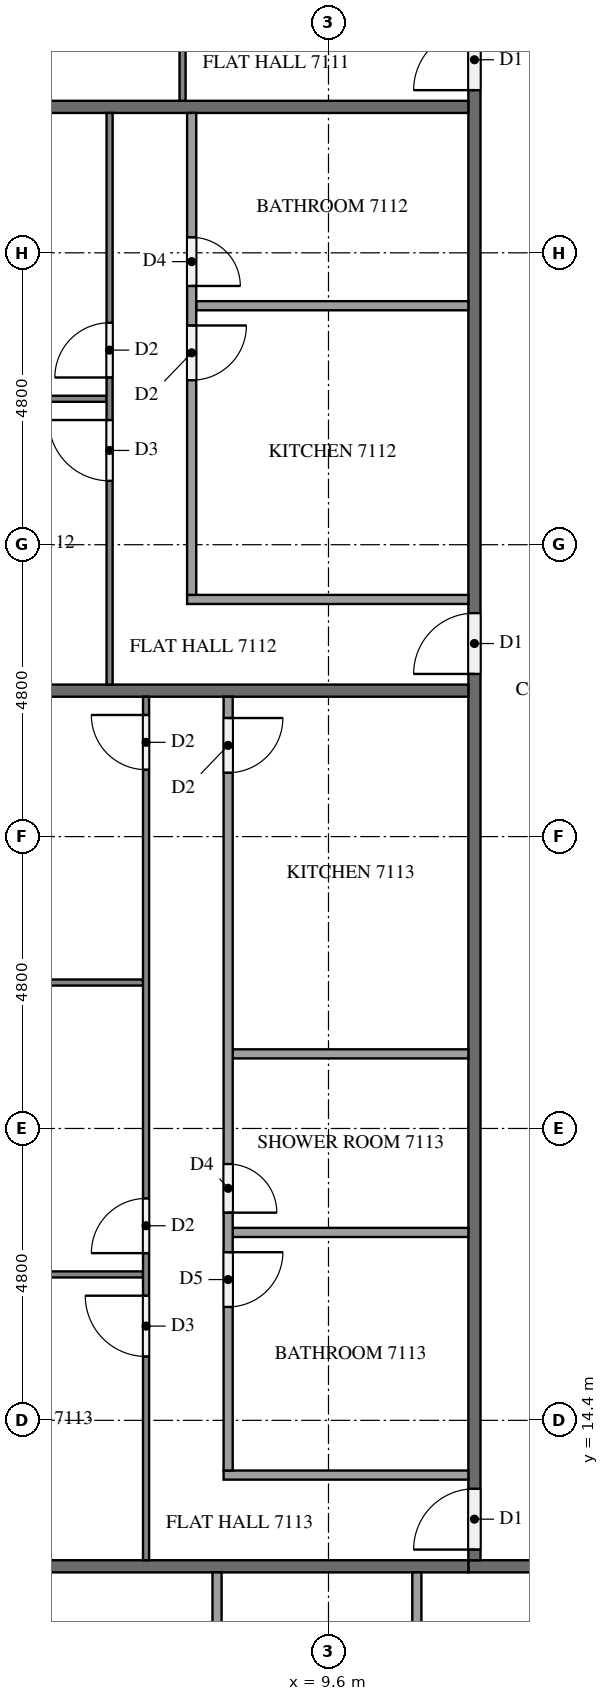
"""IFC4 building model, lengths in metres.
Left out: names, types, materials, properties, quantities, classifications, styles, units other than length and angle.
Written with IfcOpenShell. Run it as: python <this file> out.ifc"""

import sys

from ifc_helpers import new_model, si_unit, direction, frame, frame_2d, origin, place, context, subcontext, project, spatial, rectangle, extrude, element, fill, save


model = new_model("IFC4")
c1 = context("Model", 3, precision=1e-05, world=origin(), true_north=direction((0.0, 1.0)))
c2 = subcontext(c1, "Body", "Model", "MODEL_VIEW")
j1 = project(units=[si_unit("LENGTHUNIT", "METRE"), si_unit("PLANEANGLEUNIT", "RADIAN")], contexts=[c1])
p1 = place(None, origin())
s1 = spatial("IfcSite", under=j1, at=p1, CompositionType="ELEMENT")
p2 = place(p1, origin())
s2 = spatial("IfcBuilding", under=s1, at=p2, CompositionType="ELEMENT")
p3 = place(p2, frame((0.0, 0.0, 272.1)))
s3 = spatial("IfcBuildingStorey", under=s2, at=p3, CompositionType="ELEMENT", Elevation=272.1)
p4 = place(p3, frame((50.5, 12.0, 0.0), z_axis=(0.0, 0.0, 1.0), x_axis=(-1.0, 0.0, 0.0)))
e1 = element("IfcWall", 1, at=p4, inside=s3, PredefinedType="PARTITIONING", context=c2, shape_type="SweptSolid", body=[
    extrude(rectangle(XDim=38.6, YDim=0.2, at=frame_2d((19.3, 0.0))), origin(), (0.0, 0.0, 1.0), 3.2),
])
p5 = place(p4, frame((31.525, 0.0, 0.0)))
e2 = element("IfcOpeningElement", 2, at=p5, cuts=e1, PredefinedType="OPENING", context=c2, shape_type="SweptSolid", body=[
    extrude(rectangle(XDim=1.1, YDim=2.1, at=frame_2d((0.55, 1.05))), frame((0.0, 0.11, 0.0), z_axis=(0.0, -1.0, 0.0), x_axis=(1.0, 0.0, 0.0)), (0.0, 0.0, 1.0), 0.22),
])
p6 = place(p4, frame((19.575, 0.0, 0.0)))
e3 = element("IfcOpeningElement", 3, at=p6, cuts=e1, PredefinedType="OPENING", context=c2, shape_type="SweptSolid", body=[
    extrude(rectangle(XDim=1.0, YDim=2.1, at=frame_2d((0.5, 1.05))), frame((0.0, 0.11, 0.0), z_axis=(0.0, -1.0, 0.0), x_axis=(1.0, 0.0, 0.0)), (0.0, 0.0, 1.0), 0.22),
])
p7 = place(p4, frame((18.025, 0.0, 0.0)))
e4 = element("IfcOpeningElement", 4, at=p7, cuts=e1, PredefinedType="OPENING", context=c2, shape_type="SweptSolid", body=[
    extrude(rectangle(XDim=1.0, YDim=2.1, at=frame_2d((0.5, 1.05))), frame((0.0, 0.11, 0.0), z_axis=(0.0, -1.0, 0.0), x_axis=(1.0, 0.0, 0.0)), (0.0, 0.0, 1.0), 0.22),
])
p8 = place(p4, frame((1.225, 0.0, 0.0)))
e5 = element("IfcOpeningElement", 5, at=p8, cuts=e1, PredefinedType="OPENING", context=c2, shape_type="SweptSolid", body=[
    extrude(rectangle(XDim=1.0, YDim=2.1, at=frame_2d((0.5, 1.05))), frame((0.0, 0.11, 0.0), z_axis=(0.0, -1.0, 0.0), x_axis=(1.0, 0.0, 0.0)), (0.0, 0.0, 1.0), 0.22),
])
p9 = place(p3, frame((12.0, 12.1, 0.0), z_axis=(0.0, 0.0, 1.0), x_axis=(0.0, 1.0, 0.0)))
e6 = element("IfcWall", 6, at=p9, inside=s3, PredefinedType="PARTITIONING", context=c2, shape_type="SweptSolid", body=[
    extrude(rectangle(XDim=28.6, YDim=0.2, at=frame_2d((14.3, 0.0))), origin(), (0.0, 0.0, 1.0), 3.2),
])
p10 = place(p9, frame((24.175, 0.0, 0.0)))
e7 = element("IfcOpeningElement", 7, at=p10, cuts=e6, PredefinedType="OPENING", context=c2, shape_type="SweptSolid", body=[
    extrude(rectangle(XDim=1.0, YDim=2.1, at=frame_2d((0.5, 1.05))), frame((0.0, 0.11, 0.0), z_axis=(0.0, -1.0, 0.0), x_axis=(1.0, 0.0, 0.0)), (0.0, 0.0, 1.0), 0.22),
])
p11 = place(p9, frame((14.575, 0.0, 0.0)))
e8 = element("IfcOpeningElement", 8, at=p11, cuts=e6, PredefinedType="OPENING", context=c2, shape_type="SweptSolid", body=[
    extrude(rectangle(XDim=1.0, YDim=2.1, at=frame_2d((0.5, 1.05))), frame((0.0, 0.11, 0.0), z_axis=(0.0, -1.0, 0.0), x_axis=(1.0, 0.0, 0.0)), (0.0, 0.0, 1.0), 0.22),
])
p12 = place(p9, frame((0.175, 0.0, 0.0)))
e9 = element("IfcOpeningElement", 9, at=p12, cuts=e6, PredefinedType="OPENING", context=c2, shape_type="SweptSolid", body=[
    extrude(rectangle(XDim=1.0, YDim=2.1, at=frame_2d((0.5, 1.05))), frame((0.0, 0.11, 0.0), z_axis=(0.0, -1.0, 0.0), x_axis=(1.0, 0.0, 0.0)), (0.0, 0.0, 1.0), 0.22),
])
for number, where, z_axis, x_axis in (
    (10, (0.1, 12.0, 0.0), (0.0, 0.0, 1.0), (1.0, 0.0, 0.0)),
    (11, (0.1, 36.0, 0.0), (0.0, 0.0, 1.0), (1.0, 0.0, 0.0)),
    (12, (0.1, 26.4, 0.0), (0.0, 0.0, 1.0), (1.0, 0.0, 0.0)),
):
    element("IfcWall", number, at=place(p3, frame(where, z_axis=z_axis, x_axis=x_axis)), inside=s3, PredefinedType="PARTITIONING", context=c2, shape_type="SweptSolid", body=[
        extrude(rectangle(XDim=11.8, YDim=0.2, at=frame_2d((5.9, 0.0))), origin(), (0.0, 0.0, 1.0), 3.2),
    ])
for number, where, z_axis, x_axis in (
    (13, (11.053, 11.9, 0.0), (0.0, 0.0, 1.0), (0.0, -1.0, 0.0)),
    (14, (7.767, 11.9, 0.0), (0.0, 0.0, 1.0), (0.0, -1.0, 0.0)),
):
    element("IfcWall", number, at=place(p3, frame(where, z_axis=z_axis, x_axis=x_axis)), inside=s3, PredefinedType="PARTITIONING", context=c2, shape_type="SweptSolid", body=[
        extrude(rectangle(XDim=2.975, YDim=0.15, at=frame_2d((1.487, 0.0))), origin(), (0.0, 0.0, 1.0), 3.2),
    ])
p13 = place(p3, frame((7.2, 36.1, 0.0), z_axis=(0.0, 0.0, 1.0), x_axis=(0.0, 1.0, 0.0)))
e15 = element("IfcWall", 15, at=p13, inside=s3, PredefinedType="PARTITIONING", context=c2, shape_type="SweptSolid", body=[
    extrude(rectangle(XDim=11.8, YDim=0.1, at=frame_2d((5.9, 0.0))), origin(), (0.0, 0.0, 1.0), 3.2),
])
p14 = place(p13, frame((5.75, 0.0, 0.0)))
e16 = element("IfcOpeningElement", 16, at=p14, cuts=e15, PredefinedType="OPENING", context=c2, shape_type="SweptSolid", body=[
    extrude(rectangle(XDim=1.0, YDim=2.1, at=frame_2d((0.5, 1.05))), frame((0.0, 0.06, 0.0), z_axis=(0.0, -1.0, 0.0), x_axis=(1.0, 0.0, 0.0)), (0.0, 0.0, 1.0), 0.12),
])
p15 = place(p13, frame((7.45, 0.0, 0.0)))
e17 = element("IfcOpeningElement", 17, at=p15, cuts=e15, PredefinedType="OPENING", context=c2, shape_type="SweptSolid", body=[
    extrude(rectangle(XDim=0.9, YDim=2.1, at=frame_2d((0.45, 1.05))), frame((0.0, 0.06, 0.0), z_axis=(0.0, -1.0, 0.0), x_axis=(1.0, 0.0, 0.0)), (0.0, 0.0, 1.0), 0.12),
])
p16 = place(p3, frame((5.95, 31.2, 0.0), z_axis=(0.0, 0.0, 1.0), x_axis=(-1.0, 0.0, 0.0)))
e18 = element("IfcWall", 18, at=p16, inside=s3, PredefinedType="PARTITIONING", context=c2, shape_type="SweptSolid", body=[
    extrude(rectangle(XDim=5.85, YDim=0.1, at=frame_2d((2.925, 0.0))), origin(), (0.0, 0.0, 1.0), 3.2),
])
p17 = place(p3, frame((6.0, 26.5, 0.0), z_axis=(0.0, 0.0, 1.0), x_axis=(0.0, 1.0, 0.0)))
e19 = element("IfcWall", 19, at=p17, inside=s3, PredefinedType="PARTITIONING", context=c2, shape_type="SweptSolid", body=[
    extrude(rectangle(XDim=9.4, YDim=0.1, at=frame_2d((4.7, 0.0))), origin(), (0.0, 0.0, 1.0), 3.2),
])
p18 = place(p17, frame((3.35, 0.0, 0.0)))
e20 = element("IfcOpeningElement", 20, at=p18, cuts=e19, PredefinedType="OPENING", context=c2, shape_type="SweptSolid", body=[
    extrude(rectangle(XDim=1.0, YDim=2.1, at=frame_2d((0.5, 1.05))), frame((0.0, 0.06, 0.0), z_axis=(0.0, -1.0, 0.0), x_axis=(1.0, 0.0, 0.0)), (0.0, 0.0, 1.0), 0.12),
])
p19 = place(p17, frame((5.05, 0.0, 0.0)))
e21 = element("IfcOpeningElement", 21, at=p19, cuts=e19, PredefinedType="OPENING", context=c2, shape_type="SweptSolid", body=[
    extrude(rectangle(XDim=0.9, YDim=2.1, at=frame_2d((0.45, 1.05))), frame((0.0, 0.06, 0.0), z_axis=(0.0, -1.0, 0.0), x_axis=(1.0, 0.0, 0.0)), (0.0, 0.0, 1.0), 0.12),
])
p20 = place(p3, frame((11.9, 32.73, 0.0), z_axis=(0.0, 0.0, 1.0), x_axis=(-1.0, 0.0, 0.0)))
e22 = element("IfcWall", 22, at=p20, inside=s3, PredefinedType="PARTITIONING", context=c2, shape_type="SweptSolid", body=[
    extrude(rectangle(XDim=4.475, YDim=0.15, at=frame_2d((2.237, 0.0))), origin(), (0.0, 0.0, 1.0), 3.2),
])
p21 = place(p3, frame((11.9, 27.9, 0.0), z_axis=(0.0, 0.0, 1.0), x_axis=(-1.0, 0.0, 0.0)))
e23 = element("IfcWall", 23, at=p21, inside=s3, PredefinedType="PARTITIONING", context=c2, shape_type="SweptSolid", body=[
    extrude(rectangle(XDim=4.625, YDim=0.15, at=frame_2d((2.312, 0.0))), origin(), (0.0, 0.0, 1.0), 3.2),
])
p22 = place(p3, frame((7.35, 35.9, 0.0), z_axis=(0.0, 0.0, 1.0), x_axis=(0.0, -1.0, 0.0)))
e24 = element("IfcWall", 24, at=p22, inside=s3, PredefinedType="PARTITIONING", context=c2, shape_type="SweptSolid", body=[
    extrude(rectangle(XDim=7.925, YDim=0.15, at=frame_2d((3.962, 0.0))), origin(), (0.0, 0.0, 1.0), 3.2),
])
p23 = place(p22, frame((3.495, 0.0, 0.0)))
e25 = element("IfcOpeningElement", 25, at=p23, cuts=e24, PredefinedType="OPENING", context=c2, shape_type="SweptSolid", body=[
    extrude(rectangle(XDim=0.9, YDim=2.1, at=frame_2d((0.45, 1.05))), frame((0.0, 0.085, 0.0), z_axis=(0.0, -1.0, 0.0), x_axis=(1.0, 0.0, 0.0)), (0.0, 0.0, 1.0), 0.17),
])
p24 = place(p22, frame((2.045, 0.0, 0.0)))
e26 = element("IfcOpeningElement", 26, at=p24, cuts=e24, PredefinedType="OPENING", context=c2, shape_type="SweptSolid", body=[
    extrude(rectangle(XDim=0.8, YDim=2.1, at=frame_2d((0.4, 1.05))), frame((0.0, 0.085, 0.0), z_axis=(0.0, -1.0, 0.0), x_axis=(1.0, 0.0, 0.0)), (0.0, 0.0, 1.0), 0.17),
])
for number, where, z_axis, x_axis in (
    (27, (6.55, 16.8, 0.0), (0.0, 0.0, 1.0), (-1.0, 0.0, 0.0)),
    (28, (6.55, 21.6, 0.0), (0.0, 0.0, 1.0), (-1.0, 0.0, 0.0)),
):
    element("IfcWall", number, at=place(p3, frame(where, z_axis=z_axis, x_axis=x_axis)), inside=s3, PredefinedType="PARTITIONING", context=c2, shape_type="SweptSolid", body=[
        extrude(rectangle(XDim=6.45, YDim=0.1, at=frame_2d((3.225, 0.0))), origin(), (0.0, 0.0, 1.0), 3.2),
    ])
p25 = place(p3, frame((6.6, 12.1, 0.0), z_axis=(0.0, 0.0, 1.0), x_axis=(0.0, 1.0, 0.0)))
e29 = element("IfcWall", 29, at=p25, inside=s3, PredefinedType="PARTITIONING", context=c2, shape_type="SweptSolid", body=[
    extrude(rectangle(XDim=14.2, YDim=0.1, at=frame_2d((7.1, 0.0))), origin(), (0.0, 0.0, 1.0), 3.2),
])
p26 = place(p25, frame((3.35, 0.0, 0.0)))
e30 = element("IfcOpeningElement", 30, at=p26, cuts=e29, PredefinedType="OPENING", context=c2, shape_type="SweptSolid", body=[
    extrude(rectangle(XDim=1.0, YDim=2.1, at=frame_2d((0.5, 1.05))), frame((0.0, 0.06, 0.0), z_axis=(0.0, -1.0, 0.0), x_axis=(1.0, 0.0, 0.0)), (0.0, 0.0, 1.0), 0.12),
])
p27 = place(p25, frame((5.05, 0.0, 0.0)))
e31 = element("IfcOpeningElement", 31, at=p27, cuts=e29, PredefinedType="OPENING", context=c2, shape_type="SweptSolid", body=[
    extrude(rectangle(XDim=0.9, YDim=2.1, at=frame_2d((0.45, 1.05))), frame((0.0, 0.06, 0.0), z_axis=(0.0, -1.0, 0.0), x_axis=(1.0, 0.0, 0.0)), (0.0, 0.0, 1.0), 0.12),
])
p28 = place(p25, frame((13.0, 0.0, 0.0)))
e32 = element("IfcOpeningElement", 32, at=p28, cuts=e29, PredefinedType="OPENING", context=c2, shape_type="SweptSolid", body=[
    extrude(rectangle(XDim=0.9, YDim=2.1, at=frame_2d((0.45, 1.05))), frame((0.0, 0.06, 0.0), z_axis=(0.0, -1.0, 0.0), x_axis=(1.0, 0.0, 0.0)), (0.0, 0.0, 1.0), 0.12),
])
for number, where, z_axis, x_axis in (
    (33, (11.9, 17.49, 0.0), (0.0, 0.0, 1.0), (-1.0, 0.0, 0.0)),
    (34, (11.9, 20.427, 0.0), (0.0, 0.0, 1.0), (-1.0, 0.0, 0.0)),
):
    element("IfcWall", number, at=place(p3, frame(where, z_axis=z_axis, x_axis=x_axis)), inside=s3, PredefinedType="PARTITIONING", context=c2, shape_type="SweptSolid", body=[
        extrude(rectangle(XDim=3.875, YDim=0.15, at=frame_2d((1.938, 0.0))), origin(), (0.0, 0.0, 1.0), 3.2),
    ])
p29 = place(p3, frame((11.9, 13.5, 0.0), z_axis=(0.0, 0.0, 1.0), x_axis=(-1.0, 0.0, 0.0)))
e35 = element("IfcWall", 35, at=p29, inside=s3, PredefinedType="PARTITIONING", context=c2, shape_type="SweptSolid", body=[
    extrude(rectangle(XDim=4.025, YDim=0.15, at=frame_2d((2.012, 0.0))), origin(), (0.0, 0.0, 1.0), 3.2),
])
p30 = place(p3, frame((7.95, 26.3, 0.0), z_axis=(0.0, 0.0, 1.0), x_axis=(0.0, -1.0, 0.0)))
e36 = element("IfcWall", 36, at=p30, inside=s3, PredefinedType="PARTITIONING", context=c2, shape_type="SweptSolid", body=[
    extrude(rectangle(XDim=12.725, YDim=0.15, at=frame_2d((6.363, 0.0))), origin(), (0.0, 0.0, 1.0), 3.2),
])
p31 = place(p30, frame((9.135, 0.0, 0.0)))
e37 = element("IfcOpeningElement", 37, at=p31, cuts=e36, PredefinedType="OPENING", context=c2, shape_type="SweptSolid", body=[
    extrude(rectangle(XDim=0.9, YDim=2.1, at=frame_2d((0.45, 1.05))), frame((0.0, 0.085, 0.0), z_axis=(0.0, -1.0, 0.0), x_axis=(1.0, 0.0, 0.0)), (0.0, 0.0, 1.0), 0.17),
])
p32 = place(p30, frame((7.685, 0.0, 0.0)))
e38 = element("IfcOpeningElement", 38, at=p32, cuts=e36, PredefinedType="OPENING", context=c2, shape_type="SweptSolid", body=[
    extrude(rectangle(XDim=0.8, YDim=2.1, at=frame_2d((0.4, 1.05))), frame((0.0, 0.085, 0.0), z_axis=(0.0, -1.0, 0.0), x_axis=(1.0, 0.0, 0.0)), (0.0, 0.0, 1.0), 0.17),
])
p33 = place(p30, frame((0.35, 0.0, 0.0)))
e39 = element("IfcOpeningElement", 39, at=p33, cuts=e36, PredefinedType="OPENING", context=c2, shape_type="SweptSolid", body=[
    extrude(rectangle(XDim=0.9, YDim=2.1, at=frame_2d((0.45, 1.05))), frame((0.0, 0.085, 0.0), z_axis=(0.0, -1.0, 0.0), x_axis=(1.0, 0.0, 0.0)), (0.0, 0.0, 1.0), 0.17),
])
p34 = place(p10, origin())
e40 = element("IfcDoor", 40, at=p34, inside=s3, OperationType="SINGLE_SWING_LEFT", PredefinedType="DOOR", context=c2, shape_type="SweptSolid", body=[
    extrude(rectangle(XDim=1.0, YDim=2.1, at=frame_2d((0.5, 1.05))), frame((0.0, 0.025, 0.0), z_axis=(0.0, -1.0, 0.0), x_axis=(1.0, 0.0, 0.0)), (0.0, 0.0, 1.0), 0.05),
])
fill(e7, e40)
p35 = place(p11, origin())
e41 = element("IfcDoor", 41, at=p35, inside=s3, OperationType="SINGLE_SWING_LEFT", PredefinedType="DOOR", context=c2, shape_type="SweptSolid", body=[
    extrude(rectangle(XDim=1.0, YDim=2.1, at=frame_2d((0.5, 1.05))), frame((0.0, 0.025, 0.0), z_axis=(0.0, -1.0, 0.0), x_axis=(1.0, 0.0, 0.0)), (0.0, 0.0, 1.0), 0.05),
])
fill(e8, e41)
p36 = place(p12, origin())
e42 = element("IfcDoor", 42, at=p36, inside=s3, OperationType="SINGLE_SWING_LEFT", PredefinedType="DOOR", context=c2, shape_type="SweptSolid", body=[
    extrude(rectangle(XDim=1.0, YDim=2.1, at=frame_2d((0.5, 1.05))), frame((0.0, 0.025, 0.0), z_axis=(0.0, -1.0, 0.0), x_axis=(1.0, 0.0, 0.0)), (0.0, 0.0, 1.0), 0.05),
])
fill(e9, e42)
p37 = place(p18, origin())
e43 = element("IfcDoor", 43, at=p37, inside=s3, OperationType="SINGLE_SWING_RIGHT", PredefinedType="DOOR", context=c2, shape_type="SweptSolid", body=[
    extrude(rectangle(XDim=1.0, YDim=2.1, at=frame_2d((0.5, 1.05))), frame((0.0, 0.025, 0.0), z_axis=(0.0, -1.0, 0.0), x_axis=(1.0, 0.0, 0.0)), (0.0, 0.0, 1.0), 0.05),
])
fill(e20, e43)
p38 = place(p19, origin())
e44 = element("IfcDoor", 44, at=p38, inside=s3, OperationType="SINGLE_SWING_LEFT", PredefinedType="DOOR", context=c2, shape_type="SweptSolid", body=[
    extrude(rectangle(XDim=0.9, YDim=2.1, at=frame_2d((0.45, 1.05))), frame((0.0, 0.025, 0.0), z_axis=(0.0, -1.0, 0.0), x_axis=(1.0, 0.0, 0.0)), (0.0, 0.0, 1.0), 0.05),
])
fill(e21, e44)
p39 = place(p23, origin())
e45 = element("IfcDoor", 45, at=p39, inside=s3, OperationType="SINGLE_SWING_LEFT", PredefinedType="DOOR", context=c2, shape_type="SweptSolid", body=[
    extrude(rectangle(XDim=0.9, YDim=2.1, at=frame_2d((0.45, 1.05))), frame((0.0, 0.025, 0.0), z_axis=(0.0, -1.0, 0.0), x_axis=(1.0, 0.0, 0.0)), (0.0, 0.0, 1.0), 0.05),
])
fill(e25, e45)
p40 = place(p24, origin())
e46 = element("IfcDoor", 46, at=p40, inside=s3, OperationType="SINGLE_SWING_RIGHT", PredefinedType="DOOR", context=c2, shape_type="SweptSolid", body=[
    extrude(rectangle(XDim=0.8, YDim=2.1, at=frame_2d((0.4, 1.05))), frame((0.0, 0.025, 0.0), z_axis=(0.0, -1.0, 0.0), x_axis=(1.0, 0.0, 0.0)), (0.0, 0.0, 1.0), 0.05),
])
fill(e26, e46)
p41 = place(p26, origin())
e47 = element("IfcDoor", 47, at=p41, inside=s3, OperationType="SINGLE_SWING_RIGHT", PredefinedType="DOOR", context=c2, shape_type="SweptSolid", body=[
    extrude(rectangle(XDim=1.0, YDim=2.1, at=frame_2d((0.5, 1.05))), frame((0.0, 0.025, 0.0), z_axis=(0.0, -1.0, 0.0), x_axis=(1.0, 0.0, 0.0)), (0.0, 0.0, 1.0), 0.05),
])
fill(e30, e47)
p42 = place(p27, origin())
e48 = element("IfcDoor", 48, at=p42, inside=s3, OperationType="SINGLE_SWING_LEFT", PredefinedType="DOOR", context=c2, shape_type="SweptSolid", body=[
    extrude(rectangle(XDim=0.9, YDim=2.1, at=frame_2d((0.45, 1.05))), frame((0.0, 0.025, 0.0), z_axis=(0.0, -1.0, 0.0), x_axis=(1.0, 0.0, 0.0)), (0.0, 0.0, 1.0), 0.05),
])
fill(e31, e48)
p43 = place(p28, origin())
e49 = element("IfcDoor", 49, at=p43, inside=s3, OperationType="SINGLE_SWING_RIGHT", PredefinedType="DOOR", context=c2, shape_type="SweptSolid", body=[
    extrude(rectangle(XDim=0.9, YDim=2.1, at=frame_2d((0.45, 1.05))), frame((0.0, 0.025, 0.0), z_axis=(0.0, -1.0, 0.0), x_axis=(1.0, 0.0, 0.0)), (0.0, 0.0, 1.0), 0.05),
])
fill(e32, e49)
p44 = place(p31, origin())
e50 = element("IfcDoor", 50, at=p44, inside=s3, OperationType="SINGLE_SWING_LEFT", PredefinedType="DOOR", context=c2, shape_type="SweptSolid", body=[
    extrude(rectangle(XDim=0.9, YDim=2.1, at=frame_2d((0.45, 1.05))), frame((0.0, 0.025, 0.0), z_axis=(0.0, -1.0, 0.0), x_axis=(1.0, 0.0, 0.0)), (0.0, 0.0, 1.0), 0.05),
])
fill(e37, e50)
p45 = place(p32, origin())
e51 = element("IfcDoor", 51, at=p45, inside=s3, OperationType="SINGLE_SWING_RIGHT", PredefinedType="DOOR", context=c2, shape_type="SweptSolid", body=[
    extrude(rectangle(XDim=0.8, YDim=2.1, at=frame_2d((0.4, 1.05))), frame((0.0, 0.025, 0.0), z_axis=(0.0, -1.0, 0.0), x_axis=(1.0, 0.0, 0.0)), (0.0, 0.0, 1.0), 0.05),
])
fill(e38, e51)
p46 = place(p33, origin())
e52 = element("IfcDoor", 52, at=p46, inside=s3, OperationType="SINGLE_SWING_LEFT", PredefinedType="DOOR", context=c2, shape_type="SweptSolid", body=[
    extrude(rectangle(XDim=0.9, YDim=2.1, at=frame_2d((0.45, 1.05))), frame((0.0, 0.025, 0.0), z_axis=(0.0, -1.0, 0.0), x_axis=(1.0, 0.0, 0.0)), (0.0, 0.0, 1.0), 0.05),
])
fill(e39, e52)
save(model, sys.argv[1])
